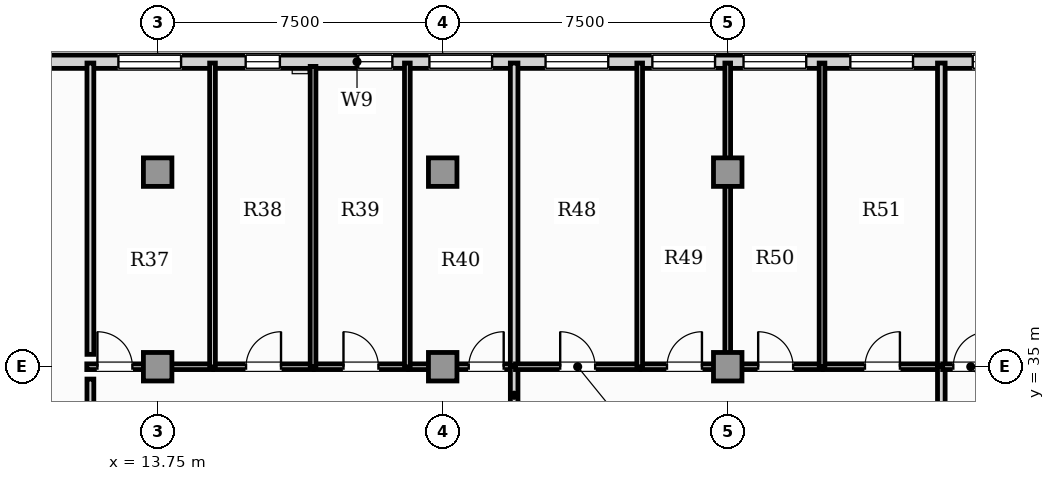
"""IFC4 building model, lengths in metres.
Left out: names, types, materials, properties, quantities, classifications, styles, units other than length and angle.
Written with IfcOpenShell. Run it as: python <this file> out.ifc"""

import sys

from ifc_helpers import new_model, si_unit, direction, frame, frame_2d, origin, origin_2d, place, context, subcontext, project, spatial, rectangle, extrude, element, fill, save


model = new_model("IFC4")
c1 = context("Model", 3, precision=1e-05, world=origin(), true_north=direction((0.0, 1.0)))
c2 = subcontext(c1, "Body", "Model", "MODEL_VIEW")
j1 = project(units=[si_unit("LENGTHUNIT", "METRE"), si_unit("PLANEANGLEUNIT", "RADIAN")], contexts=[c1])
p1 = place(None, origin())
s1 = spatial("IfcSite", under=j1, at=p1, CompositionType="ELEMENT")
p2 = place(p1, origin())
s2 = spatial("IfcBuilding", under=s1, at=p2, CompositionType="ELEMENT")
p3 = place(p2, frame((0.0, 0.0, 111.85)))
s3 = spatial("IfcBuildingStorey", under=s2, at=p3, CompositionType="ELEMENT", Elevation=111.85)
for number, where, z_axis, x_axis in (
    (1, (13.75, 40.12, 0.0), (0.0, 0.0, 1.0), (1.0, 0.0, 0.0)),
    (2, (21.25, 40.12, 0.0), (0.0, 0.0, 1.0), (1.0, 0.0, 0.0)),
    (3, (28.75, 40.12, 0.0), (0.0, 0.0, 1.0), (1.0, 0.0, 0.0)),
    (4, (13.75, 35.0, 0.0), (0.0, 0.0, 1.0), (1.0, 0.0, 0.0)),
    (5, (21.25, 35.0, 0.0), (0.0, 0.0, 1.0), (1.0, 0.0, 0.0)),
    (6, (28.75, 35.0, 0.0), (0.0, 0.0, 1.0), (1.0, 0.0, 0.0)),
):
    element("IfcColumn", number, at=place(p3, frame(where, z_axis=z_axis, x_axis=x_axis)), inside=s3, PredefinedType="COLUMN", context=c2, shape_type="SweptSolid", body=[
        extrude(rectangle(XDim=0.75, YDim=0.75, at=origin_2d()), origin(), (0.0, 0.0, 1.0), 3.85),
    ])
p4 = place(p3, frame((51.66, 43.025, 0.0), z_axis=(0.0, 0.0, 1.0), x_axis=(-1.0, 0.0, 0.0)))
e7 = element("IfcWall", 7, at=p4, inside=s3, PredefinedType="SOLIDWALL", context=c2, shape_type="SweptSolid", body=[
    extrude(rectangle(XDim=45.82, YDim=0.35, at=frame_2d((22.91, 0.0))), origin(), (0.0, 0.0, 1.0), 3.6),
])
p5 = place(p4, frame((42.393, 0.0, 0.88)))
e8 = element("IfcOpeningElement", 8, at=p5, cuts=e7, PredefinedType="OPENING", context=c2, shape_type="SweptSolid", body=[
    extrude(rectangle(XDim=1.65, YDim=2.0, at=frame_2d((0.825, 1.0))), frame((0.0, 0.185, 0.0), z_axis=(0.0, -1.0, 0.0), x_axis=(1.0, 0.0, 0.0)), (0.0, 0.0, 1.0), 0.37),
])
p6 = place(p4, frame((1.778, 0.0, 0.88)))
e9 = element("IfcOpeningElement", 9, at=p6, cuts=e7, PredefinedType="OPENING", context=c2, shape_type="SweptSolid", body=[
    extrude(rectangle(XDim=1.65, YDim=2.0, at=frame_2d((0.825, 1.0))), frame((0.0, 0.185, 0.0), z_axis=(0.0, -1.0, 0.0), x_axis=(1.0, 0.0, 0.0)), (0.0, 0.0, 1.0), 0.37),
])
p7 = place(p4, frame((37.293, 0.0, 0.88)))
e10 = element("IfcOpeningElement", 10, at=p7, cuts=e7, PredefinedType="OPENING", context=c2, shape_type="SweptSolid", body=[
    extrude(rectangle(XDim=1.65, YDim=2.0, at=frame_2d((0.825, 1.0))), frame((0.0, 0.185, 0.0), z_axis=(0.0, -1.0, 0.0), x_axis=(1.0, 0.0, 0.0)), (0.0, 0.0, 1.0), 0.37),
])
p8 = place(p4, frame((34.694, 0.0, 0.95)))
e11 = element("IfcOpeningElement", 11, at=p8, cuts=e7, PredefinedType="OPENING", context=c2, shape_type="SweptSolid", body=[
    extrude(rectangle(XDim=0.9, YDim=1.5, at=frame_2d((0.45, 0.75))), frame((0.0, 0.185, 0.0), z_axis=(0.0, -1.0, 0.0), x_axis=(1.0, 0.0, 0.0)), (0.0, 0.0, 1.0), 0.37),
])
p9 = place(p4, frame((31.734, 0.0, 1.82)))
e12 = element("IfcOpeningElement", 12, at=p9, cuts=e7, PredefinedType="OPENING", context=c2, shape_type="SweptSolid", body=[
    extrude(rectangle(XDim=0.9, YDim=1.05, at=frame_2d((0.45, 0.525))), frame((0.0, 0.185, 0.0), z_axis=(0.0, -1.0, 0.0), x_axis=(1.0, 0.0, 0.0)), (0.0, 0.0, 1.0), 0.37),
])
p10 = place(p4, frame((29.11, 0.0, 0.88)))
e13 = element("IfcOpeningElement", 13, at=p10, cuts=e7, PredefinedType="OPENING", context=c2, shape_type="SweptSolid", body=[
    extrude(rectangle(XDim=1.65, YDim=2.0, at=frame_2d((0.825, 1.0))), frame((0.0, 0.185, 0.0), z_axis=(0.0, -1.0, 0.0), x_axis=(1.0, 0.0, 0.0)), (0.0, 0.0, 1.0), 0.37),
])
p11 = place(p4, frame((26.053, 0.0, 0.88)))
e14 = element("IfcOpeningElement", 14, at=p11, cuts=e7, PredefinedType="OPENING", context=c2, shape_type="SweptSolid", body=[
    extrude(rectangle(XDim=1.65, YDim=2.0, at=frame_2d((0.825, 1.0))), frame((0.0, 0.185, 0.0), z_axis=(0.0, -1.0, 0.0), x_axis=(1.0, 0.0, 0.0)), (0.0, 0.0, 1.0), 0.37),
])
p12 = place(p4, frame((23.243, 0.0, 0.88)))
e15 = element("IfcOpeningElement", 15, at=p12, cuts=e7, PredefinedType="OPENING", context=c2, shape_type="SweptSolid", body=[
    extrude(rectangle(XDim=1.65, YDim=2.0, at=frame_2d((0.825, 1.0))), frame((0.0, 0.185, 0.0), z_axis=(0.0, -1.0, 0.0), x_axis=(1.0, 0.0, 0.0)), (0.0, 0.0, 1.0), 0.37),
])
p13 = place(p4, frame((20.844, 0.0, 0.88)))
e16 = element("IfcOpeningElement", 16, at=p13, cuts=e7, PredefinedType="OPENING", context=c2, shape_type="SweptSolid", body=[
    extrude(rectangle(XDim=1.65, YDim=2.0, at=frame_2d((0.825, 1.0))), frame((0.0, 0.185, 0.0), z_axis=(0.0, -1.0, 0.0), x_axis=(1.0, 0.0, 0.0)), (0.0, 0.0, 1.0), 0.37),
])
p14 = place(p4, frame((18.034, 0.0, 0.88)))
e17 = element("IfcOpeningElement", 17, at=p14, cuts=e7, PredefinedType="OPENING", context=c2, shape_type="SweptSolid", body=[
    extrude(rectangle(XDim=1.65, YDim=2.0, at=frame_2d((0.825, 1.0))), frame((0.0, 0.185, 0.0), z_axis=(0.0, -1.0, 0.0), x_axis=(1.0, 0.0, 0.0)), (0.0, 0.0, 1.0), 0.37),
])
p15 = place(p4, frame((14.813, 0.0, 0.88)))
e18 = element("IfcOpeningElement", 18, at=p15, cuts=e7, PredefinedType="OPENING", context=c2, shape_type="SweptSolid", body=[
    extrude(rectangle(XDim=1.65, YDim=2.0, at=frame_2d((0.825, 1.0))), frame((0.0, 0.185, 0.0), z_axis=(0.0, -1.0, 0.0), x_axis=(1.0, 0.0, 0.0)), (0.0, 0.0, 1.0), 0.37),
])
p16 = place(p4, frame((11.839, 0.0, 0.88)))
e19 = element("IfcOpeningElement", 19, at=p16, cuts=e7, PredefinedType="OPENING", context=c2, shape_type="SweptSolid", body=[
    extrude(rectangle(XDim=1.65, YDim=2.0, at=frame_2d((0.825, 1.0))), frame((0.0, 0.185, 0.0), z_axis=(0.0, -1.0, 0.0), x_axis=(1.0, 0.0, 0.0)), (0.0, 0.0, 1.0), 0.37),
])
p17 = place(p4, frame((9.276, 0.0, 0.88)))
e20 = element("IfcOpeningElement", 20, at=p17, cuts=e7, PredefinedType="OPENING", context=c2, shape_type="SweptSolid", body=[
    extrude(rectangle(XDim=1.65, YDim=2.0, at=frame_2d((0.825, 1.0))), frame((0.0, 0.185, 0.0), z_axis=(0.0, -1.0, 0.0), x_axis=(1.0, 0.0, 0.0)), (0.0, 0.0, 1.0), 0.37),
])
p18 = place(p4, frame((6.63, 0.0, 0.88)))
e21 = element("IfcOpeningElement", 21, at=p18, cuts=e7, PredefinedType="OPENING", context=c2, shape_type="SweptSolid", body=[
    extrude(rectangle(XDim=1.65, YDim=2.0, at=frame_2d((0.825, 1.0))), frame((0.0, 0.185, 0.0), z_axis=(0.0, -1.0, 0.0), x_axis=(1.0, 0.0, 0.0)), (0.0, 0.0, 1.0), 0.37),
])
p19 = place(p3, frame((11.885, 35.0, 0.0), z_axis=(0.0, 0.0, 1.0), x_axis=(1.0, 0.0, 0.0)))
e22 = element("IfcWall", 22, at=p19, inside=s3, PredefinedType="PARTITIONING", context=c2, shape_type="SweptSolid", body=[
    extrude(rectangle(XDim=3.313, YDim=0.15, at=frame_2d((1.656, 0.0))), origin(), (0.0, 0.0, 1.0), 2.983),
])
p20 = place(p19, frame((0.28, 0.0, 0.0)))
e23 = element("IfcOpeningElement", 23, at=p20, cuts=e22, PredefinedType="OPENING", context=c2, shape_type="SweptSolid", body=[
    extrude(rectangle(XDim=0.92, YDim=2.1, at=frame_2d((0.46, 1.05))), frame((0.0, 0.085, 0.0), z_axis=(0.0, -1.0, 0.0), x_axis=(1.0, 0.0, 0.0)), (0.0, 0.0, 1.0), 0.17),
])
p21 = place(p3, frame((15.228, 35.0, 0.0), z_axis=(0.0, 0.0, 1.0), x_axis=(1.0, 0.0, 0.0)))
e24 = element("IfcWall", 24, at=p21, inside=s3, PredefinedType="PARTITIONING", context=c2, shape_type="SweptSolid", body=[
    extrude(rectangle(XDim=2.616, YDim=0.15, at=frame_2d((1.308, 0.0))), origin(), (0.0, 0.0, 1.0), 2.983),
])
p22 = place(p21, frame((0.848, 0.0, 0.0)))
e25 = element("IfcOpeningElement", 25, at=p22, cuts=e24, PredefinedType="OPENING", context=c2, shape_type="SweptSolid", body=[
    extrude(rectangle(XDim=0.92, YDim=2.1, at=frame_2d((0.46, 1.05))), frame((0.0, 0.085, 0.0), z_axis=(0.0, -1.0, 0.0), x_axis=(1.0, 0.0, 0.0)), (0.0, 0.0, 1.0), 0.17),
])
p23 = place(p3, frame((17.874, 35.0, 0.0), z_axis=(0.0, 0.0, 1.0), x_axis=(1.0, 0.0, 0.0)))
e26 = element("IfcWall", 26, at=p23, inside=s3, PredefinedType="PARTITIONING", context=c2, shape_type="SweptSolid", body=[
    extrude(rectangle(XDim=2.451, YDim=0.15, at=frame_2d((1.226, 0.0))), origin(), (0.0, 0.0, 1.0), 2.983),
])
p24 = place(p23, frame((0.766, 0.0, 0.0)))
e27 = element("IfcOpeningElement", 27, at=p24, cuts=e26, PredefinedType="OPENING", context=c2, shape_type="SweptSolid", body=[
    extrude(rectangle(XDim=0.92, YDim=2.1, at=frame_2d((0.46, 1.05))), frame((0.0, 0.085, 0.0), z_axis=(0.0, -1.0, 0.0), x_axis=(1.0, 0.0, 0.0)), (0.0, 0.0, 1.0), 0.17),
])
p25 = place(p3, frame((20.355, 35.0, 0.0), z_axis=(0.0, 0.0, 1.0), x_axis=(1.0, 0.0, 0.0)))
e28 = element("IfcWall", 28, at=p25, inside=s3, PredefinedType="PARTITIONING", context=c2, shape_type="SweptSolid", body=[
    extrude(rectangle(XDim=2.78, YDim=0.15, at=frame_2d((1.39, 0.0))), origin(), (0.0, 0.0, 1.0), 2.983),
])
p26 = place(p25, frame((1.58, 0.0, 0.0)))
e29 = element("IfcOpeningElement", 29, at=p26, cuts=e28, PredefinedType="OPENING", context=c2, shape_type="SweptSolid", body=[
    extrude(rectangle(XDim=0.92, YDim=2.1, at=frame_2d((0.46, 1.05))), frame((0.0, 0.085, 0.0), z_axis=(0.0, -1.0, 0.0), x_axis=(1.0, 0.0, 0.0)), (0.0, 0.0, 1.0), 0.17),
])
p27 = place(p3, frame((23.13, 33.495, 0.0), z_axis=(0.0, 0.0, 1.0), x_axis=(0.0, 1.0, 0.0)))
e30 = element("IfcWall", 30, at=p27, inside=s3, PredefinedType="PARTITIONING", context=c2, shape_type="SweptSolid", body=[
    extrude(rectangle(XDim=1.51, YDim=0.2, at=frame_2d((0.755, 0.0))), origin(), (0.0, 0.0, 1.0), 3.6),
])
p28 = place(p3, frame((15.193, 34.995, 0.0), z_axis=(0.0, 0.0, 1.0), x_axis=(0.0, 1.0, 0.0)))
e31 = element("IfcWall", 31, at=p28, inside=s3, PredefinedType="PARTITIONING", context=c2, shape_type="SweptSolid", body=[
    extrude(rectangle(XDim=7.995, YDim=0.15, at=frame_2d((3.998, 0.0))), origin(), (0.0, 0.0, 1.0), 3.6),
])
p29 = place(p3, frame((17.839, 34.995, 0.0), z_axis=(0.0, 0.0, 1.0), x_axis=(0.0, 1.0, 0.0)))
e32 = element("IfcWall", 32, at=p29, inside=s3, PredefinedType="PARTITIONING", context=c2, shape_type="SweptSolid", body=[
    extrude(rectangle(XDim=7.907, YDim=0.15, at=frame_2d((3.954, 0.0))), origin(), (0.0, 0.0, 1.0), 3.6),
])
p30 = place(p3, frame((20.32, 34.995, 0.0), z_axis=(0.0, 0.0, 1.0), x_axis=(0.0, 1.0, 0.0)))
e33 = element("IfcWall", 33, at=p30, inside=s3, PredefinedType="PARTITIONING", context=c2, shape_type="SweptSolid", body=[
    extrude(rectangle(XDim=7.995, YDim=0.15, at=frame_2d((3.998, 0.0))), origin(), (0.0, 0.0, 1.0), 3.6),
])
p31 = place(p3, frame((23.13, 35.035, 0.0), z_axis=(0.0, 0.0, 1.0), x_axis=(0.0, 1.0, 0.0)))
e34 = element("IfcWall", 34, at=p31, inside=s3, PredefinedType="PARTITIONING", context=c2, shape_type="SweptSolid", body=[
    extrude(rectangle(XDim=7.955, YDim=0.2, at=frame_2d((3.978, 0.0))), origin(), (0.0, 0.0, 1.0), 3.6),
])
p32 = place(p3, frame((23.165, 35.0, 0.0), z_axis=(0.0, 0.0, 1.0), x_axis=(1.0, 0.0, 0.0)))
e35 = element("IfcWall", 35, at=p32, inside=s3, PredefinedType="PARTITIONING", context=c2, shape_type="SweptSolid", body=[
    extrude(rectangle(XDim=3.273, YDim=0.15, at=frame_2d((1.636, 0.0))), origin(), (0.0, 0.0, 1.0), 2.983),
])
p33 = place(p32, frame((1.177, 0.0, 0.0)))
e36 = element("IfcOpeningElement", 36, at=p33, cuts=e35, PredefinedType="OPENING", context=c2, shape_type="SweptSolid", body=[
    extrude(rectangle(XDim=0.92, YDim=2.1, at=frame_2d((0.46, 1.05))), frame((0.0, 0.085, 0.0), z_axis=(0.0, -1.0, 0.0), x_axis=(1.0, 0.0, 0.0)), (0.0, 0.0, 1.0), 0.17),
])
p34 = place(p3, frame((26.468, 35.0, 0.0), z_axis=(0.0, 0.0, 1.0), x_axis=(1.0, 0.0, 0.0)))
e37 = element("IfcWall", 37, at=p34, inside=s3, PredefinedType="PARTITIONING", context=c2, shape_type="SweptSolid", body=[
    extrude(rectangle(XDim=2.287, YDim=0.15, at=frame_2d((1.144, 0.0))), origin(), (0.0, 0.0, 1.0), 2.983),
])
p35 = place(p34, frame((0.683, 0.0, 0.0)))
e38 = element("IfcOpeningElement", 38, at=p35, cuts=e37, PredefinedType="OPENING", context=c2, shape_type="SweptSolid", body=[
    extrude(rectangle(XDim=0.92, YDim=2.1, at=frame_2d((0.46, 1.05))), frame((0.0, 0.085, 0.0), z_axis=(0.0, -1.0, 0.0), x_axis=(1.0, 0.0, 0.0)), (0.0, 0.0, 1.0), 0.17),
])
p36 = place(p3, frame((28.785, 35.0, 0.0), z_axis=(0.0, 0.0, 1.0), x_axis=(1.0, 0.0, 0.0)))
e39 = element("IfcWall", 39, at=p36, inside=s3, PredefinedType="PARTITIONING", context=c2, shape_type="SweptSolid", body=[
    extrude(rectangle(XDim=2.451, YDim=0.15, at=frame_2d((1.226, 0.0))), origin(), (0.0, 0.0, 1.0), 2.983),
])
p37 = place(p36, frame((0.766, 0.0, 0.0)))
e40 = element("IfcOpeningElement", 40, at=p37, cuts=e39, PredefinedType="OPENING", context=c2, shape_type="SweptSolid", body=[
    extrude(rectangle(XDim=0.92, YDim=2.1, at=frame_2d((0.46, 1.05))), frame((0.0, 0.085, 0.0), z_axis=(0.0, -1.0, 0.0), x_axis=(1.0, 0.0, 0.0)), (0.0, 0.0, 1.0), 0.17),
])
p38 = place(p3, frame((31.266, 35.0, 0.0), z_axis=(0.0, 0.0, 1.0), x_axis=(1.0, 0.0, 0.0)))
e41 = element("IfcWall", 41, at=p38, inside=s3, PredefinedType="PARTITIONING", context=c2, shape_type="SweptSolid", body=[
    extrude(rectangle(XDim=3.109, YDim=0.15, at=frame_2d((1.554, 0.0))), origin(), (0.0, 0.0, 1.0), 2.983),
])
p39 = place(p38, frame((1.094, 0.0, 0.0)))
e42 = element("IfcOpeningElement", 42, at=p39, cuts=e41, PredefinedType="OPENING", context=c2, shape_type="SweptSolid", body=[
    extrude(rectangle(XDim=0.92, YDim=2.1, at=frame_2d((0.46, 1.05))), frame((0.0, 0.085, 0.0), z_axis=(0.0, -1.0, 0.0), x_axis=(1.0, 0.0, 0.0)), (0.0, 0.0, 1.0), 0.17),
])
p40 = place(p3, frame((34.37, 33.495, 0.0), z_axis=(0.0, 0.0, 1.0), x_axis=(0.0, 1.0, 0.0)))
e43 = element("IfcWall", 43, at=p40, inside=s3, PredefinedType="PARTITIONING", context=c2, shape_type="SweptSolid", body=[
    extrude(rectangle(XDim=1.51, YDim=0.2, at=frame_2d((0.755, 0.0))), origin(), (0.0, 0.0, 1.0), 3.6),
])
for number, where, z_axis, x_axis in (
    (44, (26.433, 34.995, 0.0), (0.0, 0.0, 1.0), (0.0, 1.0, 0.0)),
    (45, (28.75, 34.995, 0.0), (0.0, 0.0, 1.0), (0.0, 1.0, 0.0)),
    (46, (31.231, 34.995, 0.0), (0.0, 0.0, 1.0), (0.0, 1.0, 0.0)),
):
    element("IfcWall", number, at=place(p3, frame(where, z_axis=z_axis, x_axis=x_axis)), inside=s3, PredefinedType="PARTITIONING", context=c2, shape_type="SweptSolid", body=[
        extrude(rectangle(XDim=7.995, YDim=0.15, at=frame_2d((3.998, 0.0))), origin(), (0.0, 0.0, 1.0), 3.6),
    ])
p41 = place(p3, frame((34.37, 35.035, 0.0), z_axis=(0.0, 0.0, 1.0), x_axis=(0.0, 1.0, 0.0)))
e47 = element("IfcWall", 47, at=p41, inside=s3, PredefinedType="PARTITIONING", context=c2, shape_type="SweptSolid", body=[
    extrude(rectangle(XDim=7.955, YDim=0.2, at=frame_2d((3.978, 0.0))), origin(), (0.0, 0.0, 1.0), 3.6),
])
p42 = place(p3, frame((34.405, 35.0, 0.0), z_axis=(0.0, 0.0, 1.0), x_axis=(1.0, 0.0, 0.0)))
e48 = element("IfcWall", 48, at=p42, inside=s3, PredefinedType="PARTITIONING", context=c2, shape_type="SweptSolid", body=[
    extrude(rectangle(XDim=3.273, YDim=0.15, at=frame_2d((1.636, 0.0))), origin(), (0.0, 0.0, 1.0), 2.983),
])
p43 = place(p42, frame((0.28, 0.0, 0.0)))
e49 = element("IfcOpeningElement", 49, at=p43, cuts=e48, PredefinedType="OPENING", context=c2, shape_type="SweptSolid", body=[
    extrude(rectangle(XDim=0.92, YDim=2.1, at=frame_2d((0.46, 1.05))), frame((0.0, 0.085, 0.0), z_axis=(0.0, -1.0, 0.0), x_axis=(1.0, 0.0, 0.0)), (0.0, 0.0, 1.0), 0.17),
])
p44 = place(p3, frame((11.98, 33.825, 0.0), z_axis=(0.0, 0.0, 1.0), x_axis=(0.0, 1.0, 0.0)))
e50 = element("IfcWall", 50, at=p44, inside=s3, PredefinedType="PARTITIONING", context=c2, shape_type="SweptSolid", body=[
    extrude(rectangle(XDim=0.85, YDim=0.18, at=frame_2d((0.425, 0.0))), origin(), (0.0, 0.0, 1.0), 3.6),
])
p45 = place(p3, frame((11.98, 35.325, 0.0), z_axis=(0.0, 0.0, 1.0), x_axis=(0.0, 1.0, 0.0)))
e51 = element("IfcWall", 51, at=p45, inside=s3, PredefinedType="PARTITIONING", context=c2, shape_type="SweptSolid", body=[
    extrude(rectangle(XDim=7.665, YDim=0.18, at=frame_2d((3.833, 0.0))), origin(), (0.0, 0.0, 1.0), 3.6),
])
p46 = place(p7, origin())
e52 = element("IfcWindow", 52, at=p46, inside=s3, PartitioningType="SINGLE_PANEL", PredefinedType="WINDOW", context=c2, shape_type="SweptSolid", body=[
    extrude(rectangle(XDim=1.65, YDim=2.0, at=frame_2d((0.825, 1.0))), frame((0.0, 0.03, 0.0), z_axis=(0.0, -1.0, 0.0), x_axis=(1.0, 0.0, 0.0)), (0.0, 0.0, 1.0), 0.06),
])
fill(e10, e52)
p47 = place(p8, origin())
e53 = element("IfcWindow", 53, at=p47, inside=s3, PartitioningType="SINGLE_PANEL", PredefinedType="WINDOW", context=c2, shape_type="SweptSolid", body=[
    extrude(rectangle(XDim=0.9, YDim=1.5, at=frame_2d((0.45, 0.75))), frame((0.0, 0.03, 0.0), z_axis=(0.0, -1.0, 0.0), x_axis=(1.0, 0.0, 0.0)), (0.0, 0.0, 1.0), 0.06),
])
fill(e11, e53)
p48 = place(p9, origin())
e54 = element("IfcWindow", 54, at=p48, inside=s3, PartitioningType="SINGLE_PANEL", PredefinedType="WINDOW", context=c2, shape_type="SweptSolid", body=[
    extrude(rectangle(XDim=0.9, YDim=1.05, at=frame_2d((0.45, 0.525))), frame((0.0, 0.03, 0.0), z_axis=(0.0, -1.0, 0.0), x_axis=(1.0, 0.0, 0.0)), (0.0, 0.0, 1.0), 0.06),
])
fill(e12, e54)
p49 = place(p10, origin())
e55 = element("IfcWindow", 55, at=p49, inside=s3, PartitioningType="SINGLE_PANEL", PredefinedType="WINDOW", context=c2, shape_type="SweptSolid", body=[
    extrude(rectangle(XDim=1.65, YDim=2.0, at=frame_2d((0.825, 1.0))), frame((0.0, 0.03, 0.0), z_axis=(0.0, -1.0, 0.0), x_axis=(1.0, 0.0, 0.0)), (0.0, 0.0, 1.0), 0.06),
])
fill(e13, e55)
p50 = place(p11, origin())
e56 = element("IfcWindow", 56, at=p50, inside=s3, PartitioningType="SINGLE_PANEL", PredefinedType="WINDOW", context=c2, shape_type="SweptSolid", body=[
    extrude(rectangle(XDim=1.65, YDim=2.0, at=frame_2d((0.825, 1.0))), frame((0.0, 0.03, 0.0), z_axis=(0.0, -1.0, 0.0), x_axis=(1.0, 0.0, 0.0)), (0.0, 0.0, 1.0), 0.06),
])
fill(e14, e56)
p51 = place(p12, origin())
e57 = element("IfcWindow", 57, at=p51, inside=s3, PartitioningType="SINGLE_PANEL", PredefinedType="WINDOW", context=c2, shape_type="SweptSolid", body=[
    extrude(rectangle(XDim=1.65, YDim=2.0, at=frame_2d((0.825, 1.0))), frame((0.0, 0.03, 0.0), z_axis=(0.0, -1.0, 0.0), x_axis=(1.0, 0.0, 0.0)), (0.0, 0.0, 1.0), 0.06),
])
fill(e15, e57)
p52 = place(p13, origin())
e58 = element("IfcWindow", 58, at=p52, inside=s3, PartitioningType="SINGLE_PANEL", PredefinedType="WINDOW", context=c2, shape_type="SweptSolid", body=[
    extrude(rectangle(XDim=1.65, YDim=2.0, at=frame_2d((0.825, 1.0))), frame((0.0, 0.03, 0.0), z_axis=(0.0, -1.0, 0.0), x_axis=(1.0, 0.0, 0.0)), (0.0, 0.0, 1.0), 0.06),
])
fill(e16, e58)
p53 = place(p14, origin())
e59 = element("IfcWindow", 59, at=p53, inside=s3, PartitioningType="SINGLE_PANEL", PredefinedType="WINDOW", context=c2, shape_type="SweptSolid", body=[
    extrude(rectangle(XDim=1.65, YDim=2.0, at=frame_2d((0.825, 1.0))), frame((0.0, 0.03, 0.0), z_axis=(0.0, -1.0, 0.0), x_axis=(1.0, 0.0, 0.0)), (0.0, 0.0, 1.0), 0.06),
])
fill(e17, e59)
p54 = place(p15, origin())
e60 = element("IfcWindow", 60, at=p54, inside=s3, PartitioningType="SINGLE_PANEL", PredefinedType="WINDOW", context=c2, shape_type="SweptSolid", body=[
    extrude(rectangle(XDim=1.65, YDim=2.0, at=frame_2d((0.825, 1.0))), frame((0.0, 0.03, 0.0), z_axis=(0.0, -1.0, 0.0), x_axis=(1.0, 0.0, 0.0)), (0.0, 0.0, 1.0), 0.06),
])
fill(e18, e60)
p55 = place(p20, origin())
e61 = element("IfcDoor", 61, at=p55, inside=s3, OperationType="SINGLE_SWING_LEFT", PredefinedType="DOOR", context=c2, shape_type="SweptSolid", body=[
    extrude(rectangle(XDim=0.92, YDim=2.1, at=frame_2d((0.46, 1.05))), frame((0.0, 0.025, 0.0), z_axis=(0.0, -1.0, 0.0), x_axis=(1.0, 0.0, 0.0)), (0.0, 0.0, 1.0), 0.05),
])
fill(e23, e61)
p56 = place(p22, origin())
e62 = element("IfcDoor", 62, at=p56, inside=s3, OperationType="SINGLE_SWING_RIGHT", PredefinedType="DOOR", context=c2, shape_type="SweptSolid", body=[
    extrude(rectangle(XDim=0.92, YDim=2.1, at=frame_2d((0.46, 1.05))), frame((0.0, 0.025, 0.0), z_axis=(0.0, -1.0, 0.0), x_axis=(1.0, 0.0, 0.0)), (0.0, 0.0, 1.0), 0.05),
])
fill(e25, e62)
p57 = place(p24, origin())
e63 = element("IfcDoor", 63, at=p57, inside=s3, OperationType="SINGLE_SWING_LEFT", PredefinedType="DOOR", context=c2, shape_type="SweptSolid", body=[
    extrude(rectangle(XDim=0.92, YDim=2.1, at=frame_2d((0.46, 1.05))), frame((0.0, 0.025, 0.0), z_axis=(0.0, -1.0, 0.0), x_axis=(1.0, 0.0, 0.0)), (0.0, 0.0, 1.0), 0.05),
])
fill(e27, e63)
p58 = place(p26, origin())
e64 = element("IfcDoor", 64, at=p58, inside=s3, OperationType="SINGLE_SWING_RIGHT", PredefinedType="DOOR", context=c2, shape_type="SweptSolid", body=[
    extrude(rectangle(XDim=0.92, YDim=2.1, at=frame_2d((0.46, 1.05))), frame((0.0, 0.025, 0.0), z_axis=(0.0, -1.0, 0.0), x_axis=(1.0, 0.0, 0.0)), (0.0, 0.0, 1.0), 0.05),
])
fill(e29, e64)
p59 = place(p33, origin())
e65 = element("IfcDoor", 65, at=p59, inside=s3, OperationType="SINGLE_SWING_LEFT", PredefinedType="DOOR", context=c2, shape_type="SweptSolid", body=[
    extrude(rectangle(XDim=0.92, YDim=2.1, at=frame_2d((0.46, 1.05))), frame((0.0, 0.025, 0.0), z_axis=(0.0, -1.0, 0.0), x_axis=(1.0, 0.0, 0.0)), (0.0, 0.0, 1.0), 0.05),
])
fill(e36, e65)
p60 = place(p35, origin())
e66 = element("IfcDoor", 66, at=p60, inside=s3, OperationType="SINGLE_SWING_RIGHT", PredefinedType="DOOR", context=c2, shape_type="SweptSolid", body=[
    extrude(rectangle(XDim=0.92, YDim=2.1, at=frame_2d((0.46, 1.05))), frame((0.0, 0.025, 0.0), z_axis=(0.0, -1.0, 0.0), x_axis=(1.0, 0.0, 0.0)), (0.0, 0.0, 1.0), 0.05),
])
fill(e38, e66)
p61 = place(p37, origin())
e67 = element("IfcDoor", 67, at=p61, inside=s3, OperationType="SINGLE_SWING_LEFT", PredefinedType="DOOR", context=c2, shape_type="SweptSolid", body=[
    extrude(rectangle(XDim=0.92, YDim=2.1, at=frame_2d((0.46, 1.05))), frame((0.0, 0.025, 0.0), z_axis=(0.0, -1.0, 0.0), x_axis=(1.0, 0.0, 0.0)), (0.0, 0.0, 1.0), 0.05),
])
fill(e40, e67)
p62 = place(p39, origin())
e68 = element("IfcDoor", 68, at=p62, inside=s3, OperationType="SINGLE_SWING_RIGHT", PredefinedType="DOOR", context=c2, shape_type="SweptSolid", body=[
    extrude(rectangle(XDim=0.92, YDim=2.1, at=frame_2d((0.46, 1.05))), frame((0.0, 0.025, 0.0), z_axis=(0.0, -1.0, 0.0), x_axis=(1.0, 0.0, 0.0)), (0.0, 0.0, 1.0), 0.05),
])
fill(e42, e68)
p63 = place(p43, origin())
e69 = element("IfcDoor", 69, at=p63, inside=s3, OperationType="SINGLE_SWING_RIGHT", PredefinedType="DOOR", context=c2, shape_type="SweptSolid", body=[
    extrude(rectangle(XDim=0.92, YDim=2.1, at=frame_2d((0.46, 1.05))), frame((0.0, 0.025, 0.0), z_axis=(0.0, -1.0, 0.0), x_axis=(1.0, 0.0, 0.0)), (0.0, 0.0, 1.0), 0.05),
])
fill(e49, e69)
save(model, sys.argv[1])
